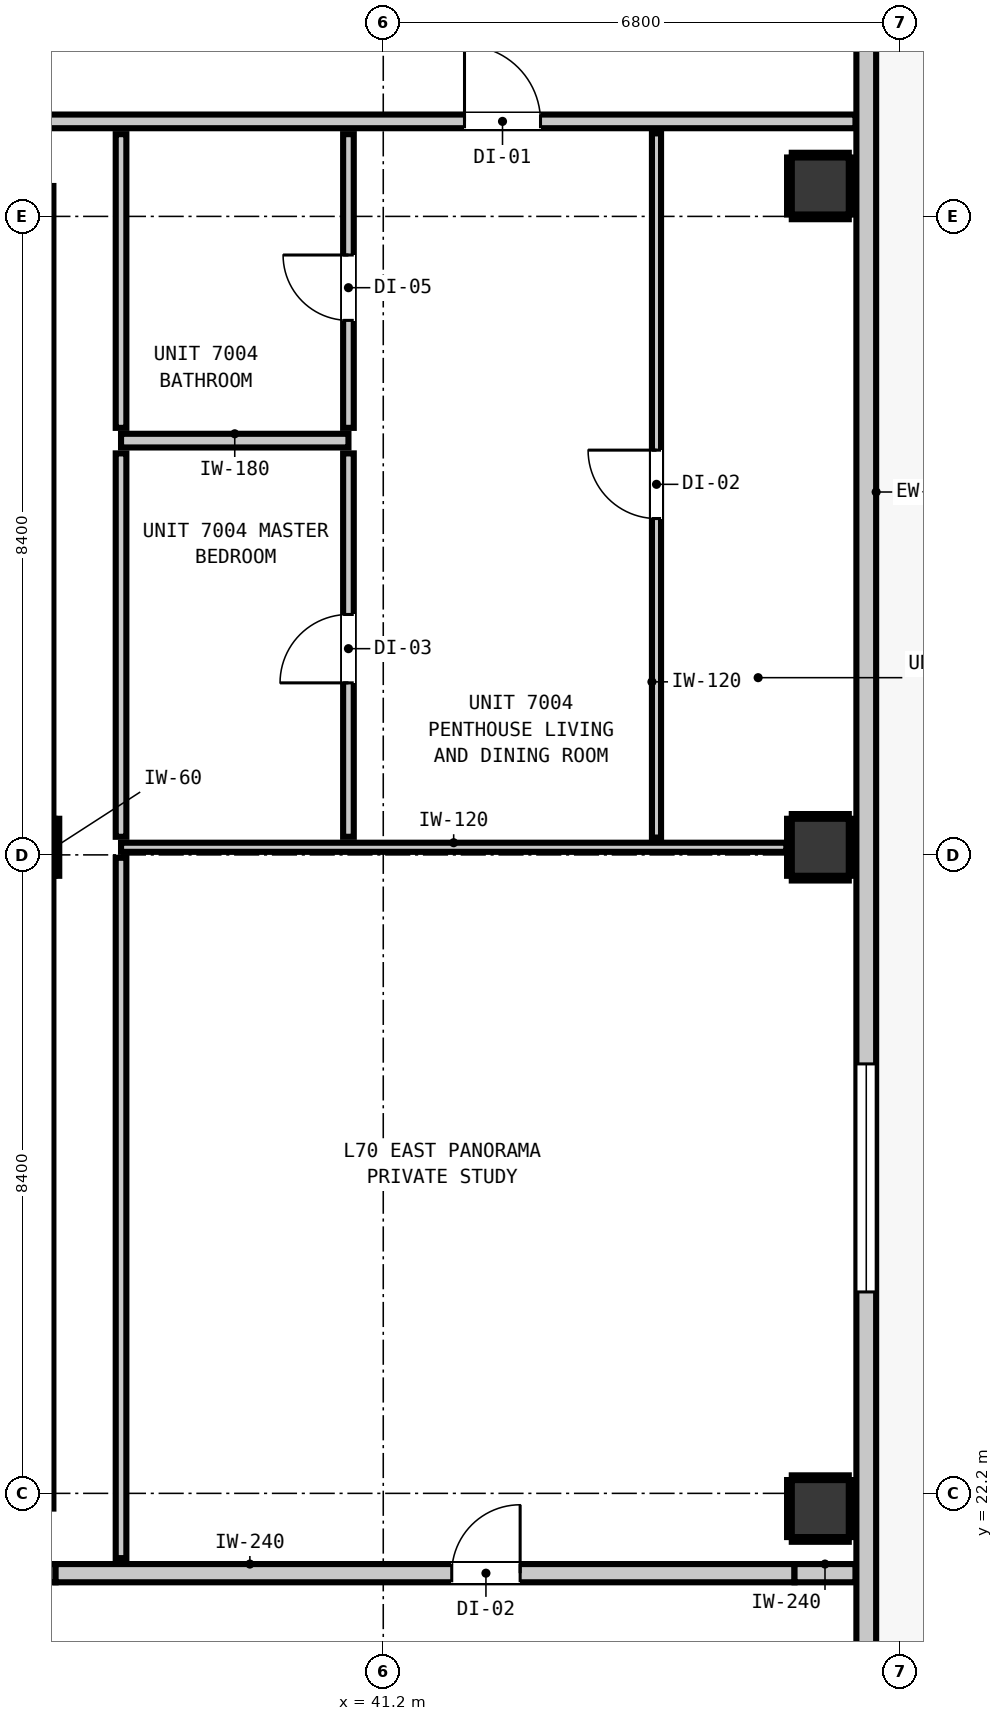
"""IFC4 building model, lengths in metres.
Left out: names, types, materials, properties, quantities, classifications, styles, units other than length and angle.
Written with IfcOpenShell. Run it as: python <this file> out.ifc"""

import sys

from ifc_helpers import new_model, si_unit, direction, frame, frame_2d, origin, origin_2d, place, context, subcontext, project, spatial, rectangle, extrude, element, fill, save


model = new_model("IFC4")
c1 = context("Model", 3, precision=1e-05, world=origin(), true_north=direction((0.0, 1.0)))
c2 = subcontext(c1, "Body", "Model", "MODEL_VIEW")
j1 = project(units=[si_unit("LENGTHUNIT", "METRE"), si_unit("PLANEANGLEUNIT", "RADIAN")], contexts=[c1])
p1 = place(None, origin())
s1 = spatial("IfcSite", under=j1, at=p1, CompositionType="ELEMENT")
p2 = place(p1, origin())
s2 = spatial("IfcBuilding", under=s1, at=p2, CompositionType="ELEMENT")
p3 = place(p2, frame((0.0, 0.0, 241.24)))
s3 = spatial("IfcBuildingStorey", under=s2, at=p3, CompositionType="ELEMENT", Elevation=241.24)
p4 = place(p3, frame((36.5, 30.7, 0.0), z_axis=(0.0, 0.0, 1.0), x_axis=(1.0, 0.0, 0.0)))
e1 = element("IfcColumn", 1, at=p4, inside=s3, PredefinedType="COLUMN", context=c2, shape_type="SweptSolid", body=[
    extrude(rectangle(XDim=0.75, YDim=0.75, at=origin_2d()), origin(), (0.0, 0.0, 1.0), 3.32),
])
p5 = place(p3, frame((36.46, 22.0, 0.0), z_axis=(0.0, 0.0, 1.0), x_axis=(0.0, 1.0, 0.0)))
e2 = element("IfcWall", 2, at=p5, inside=s3, PredefinedType="SHEAR", context=c2, shape_type="SweptSolid", body=[
    extrude(rectangle(XDim=8.32, YDim=0.8, at=frame_2d((4.16, 0.0))), origin(), (0.0, 0.0, 1.0), 3.32),
])
p6 = place(p3, frame((36.46, 31.08, 0.0), z_axis=(0.0, 0.0, 1.0), x_axis=(0.0, 1.0, 0.0)))
e3 = element("IfcWall", 3, at=p6, inside=s3, PredefinedType="SHEAR", context=c2, shape_type="SweptSolid", body=[
    extrude(rectangle(XDim=8.32, YDim=0.8, at=frame_2d((4.16, 0.0))), origin(), (0.0, 0.0, 1.0), 3.32),
])
for number, where, z_axis, x_axis in (
    (4, (46.95, 22.0, 0.0), (0.0, 0.0, 1.0), (1.0, 0.0, 0.0)),
    (5, (46.95, 30.7, 0.0), (0.0, 0.0, 1.0), (1.0, 0.0, 0.0)),
    (6, (46.95, 39.4, 0.0), (0.0, 0.0, 1.0), (1.0, 0.0, 0.0)),
):
    element("IfcColumn", number, at=place(p3, frame(where, z_axis=z_axis, x_axis=x_axis)), inside=s3, PredefinedType="COLUMN", context=c2, shape_type="SweptSolid", body=[
        extrude(rectangle(XDim=0.75, YDim=0.75, at=origin_2d()), origin(), (0.0, 0.0, 1.0), 3.32),
    ])
p7 = place(p3, frame((47.555, 48.855, 0.0), z_axis=(0.0, 0.0, 1.0), x_axis=(0.0, -1.0, 0.0)))
e7 = element("IfcWall", 7, at=p7, inside=s3, PredefinedType="STANDARD", context=c2, shape_type="SweptSolid", body=[
    extrude(rectangle(XDim=30.31, YDim=0.26, at=frame_2d((15.155, 0.0))), origin(), (0.0, 0.0, 1.0), 3.1),
])
p8 = place(p7, frame((0.91, 0.0, 0.0)))
e8 = element("IfcOpeningElement", 8, at=p8, cuts=e7, PredefinedType="OPENING", context=c2, shape_type="SweptSolid", body=[
    extrude(rectangle(XDim=1.0, YDim=2.15, at=frame_2d((0.5, 1.075))), frame((0.0, 0.14, 0.0), z_axis=(0.0, -1.0, 0.0), x_axis=(1.0, 0.0, 0.0)), (0.0, 0.0, 1.0), 0.28),
])
p9 = place(p7, frame((2.957, 0.0, 0.85)))
e9 = element("IfcOpeningElement", 9, at=p9, cuts=e7, PredefinedType="OPENING", context=c2, shape_type="SweptSolid", body=[
    extrude(rectangle(XDim=3.0, YDim=2.1, at=frame_2d((1.5, 1.05))), frame((0.0, 0.14, 0.0), z_axis=(0.0, -1.0, 0.0), x_axis=(1.0, 0.0, 0.0)), (0.0, 0.0, 1.0), 0.28),
])
p10 = place(p7, frame((21.005, 0.0, 0.85)))
e10 = element("IfcOpeningElement", 10, at=p10, cuts=e7, PredefinedType="OPENING", context=c2, shape_type="SweptSolid", body=[
    extrude(rectangle(XDim=3.0, YDim=2.1, at=frame_2d((1.5, 1.05))), frame((0.0, 0.14, 0.0), z_axis=(0.0, -1.0, 0.0), x_axis=(1.0, 0.0, 0.0)), (0.0, 0.0, 1.0), 0.28),
])
p11 = place(p3, frame((10.787, 21.15, 0.0), z_axis=(0.0, 0.0, 1.0), x_axis=(1.0, 0.0, 0.0)))
e11 = element("IfcWall", 11, at=p11, inside=s3, PredefinedType="PARTITIONING", context=c2, shape_type="SweptSolid", body=[
    extrude(rectangle(XDim=26.102, YDim=0.24, at=frame_2d((13.051, 0.0))), origin(), (0.0, 0.0, 1.0), 3.1),
])
p12 = place(p11, frame((7.423, 0.0, 0.0)))
e12 = element("IfcOpeningElement", 12, at=p12, cuts=e11, PredefinedType="OPENING", context=c2, shape_type="SweptSolid", body=[
    extrude(rectangle(XDim=1.1, YDim=2.15, at=frame_2d((0.55, 1.075))), frame((0.0, 0.13, 0.0), z_axis=(0.0, -1.0, 0.0), x_axis=(1.0, 0.0, 0.0)), (0.0, 0.0, 1.0), 0.26),
])
p13 = place(p3, frame((36.889, 21.15, 0.0), z_axis=(0.0, 0.0, 1.0), x_axis=(1.0, 0.0, 0.0)))
e13 = element("IfcWall", 13, at=p13, inside=s3, PredefinedType="PARTITIONING", context=c2, shape_type="SweptSolid", body=[
    extrude(rectangle(XDim=9.722, YDim=0.24, at=frame_2d((4.861, 0.0))), origin(), (0.0, 0.0, 1.0), 2.477),
])
p14 = place(p13, frame((5.212, 0.0, 0.0)))
e14 = element("IfcOpeningElement", 14, at=p14, cuts=e13, PredefinedType="OPENING", context=c2, shape_type="SweptSolid", body=[
    extrude(rectangle(XDim=0.9, YDim=2.1, at=frame_2d((0.45, 1.05))), frame((0.0, 0.13, 0.0), z_axis=(0.0, -1.0, 0.0), x_axis=(1.0, 0.0, 0.0)), (0.0, 0.0, 1.0), 0.26),
])
p15 = place(p3, frame((46.611, 21.15, 0.0), z_axis=(0.0, 0.0, 1.0), x_axis=(1.0, 0.0, 0.0)))
e15 = element("IfcWall", 15, at=p15, inside=s3, PredefinedType="PARTITIONING", context=c2, shape_type="SweptSolid", body=[
    extrude(rectangle(XDim=0.802, YDim=0.24, at=frame_2d((0.401, 0.0))), origin(), (0.0, 0.0, 1.0), 3.1),
])
p16 = place(p3, frame((37.75, 36.05, 0.0), z_axis=(0.0, 0.0, 1.0), x_axis=(1.0, 0.0, 0.0)))
e16 = element("IfcWall", 16, at=p16, inside=s3, PredefinedType="PARTITIONING", context=c2, shape_type="SweptSolid", body=[
    extrude(rectangle(XDim=2.992, YDim=0.18, at=frame_2d((1.496, 0.0))), origin(), (0.0, 0.0, 1.0), 3.1),
])
p17 = place(p3, frame((10.787, 40.25, 0.0), z_axis=(0.0, 0.0, 1.0), x_axis=(1.0, 0.0, 0.0)))
e17 = element("IfcWall", 17, at=p17, inside=s3, PredefinedType="PARTITIONING", context=c2, shape_type="SweptSolid", body=[
    extrude(rectangle(XDim=36.626, YDim=0.18, at=frame_2d((18.313, 0.0))), origin(), (0.0, 0.0, 1.0), 3.1),
])
p18 = place(p17, frame((6.648, 0.0, 0.0)))
e18 = element("IfcOpeningElement", 18, at=p18, cuts=e17, PredefinedType="OPENING", context=c2, shape_type="SweptSolid", body=[
    extrude(rectangle(XDim=1.4, YDim=2.15, at=frame_2d((0.7, 1.075))), frame((0.0, 0.1, 0.0), z_axis=(0.0, -1.0, 0.0), x_axis=(1.0, 0.0, 0.0)), (0.0, 0.0, 1.0), 0.2),
])
p19 = place(p17, frame((31.482, 0.0, 0.0)))
e19 = element("IfcOpeningElement", 19, at=p19, cuts=e17, PredefinedType="OPENING", context=c2, shape_type="SweptSolid", body=[
    extrude(rectangle(XDim=1.0, YDim=2.15, at=frame_2d((0.5, 1.075))), frame((0.0, 0.1, 0.0), z_axis=(0.0, -1.0, 0.0), x_axis=(1.0, 0.0, 0.0)), (0.0, 0.0, 1.0), 0.2),
])
p20 = place(p3, frame((37.75, 30.7, 0.0), z_axis=(0.0, 0.0, 1.0), x_axis=(1.0, 0.0, 0.0)))
e20 = element("IfcWall", 20, at=p20, inside=s3, PredefinedType="PARTITIONING", context=c2, shape_type="SweptSolid", body=[
    extrude(rectangle(XDim=8.753, YDim=0.12, at=frame_2d((4.376, 0.0))), origin(), (0.0, 0.0, 1.0), 2.335),
])
p21 = place(p3, frame((37.75, 21.348, 0.0), z_axis=(0.0, 0.0, 1.0), x_axis=(0.0, 1.0, 0.0)))
e21 = element("IfcWall", 21, at=p21, inside=s3, PredefinedType="PARTITIONING", context=c2, shape_type="SweptSolid", body=[
    extrude(rectangle(XDim=9.214, YDim=0.14, at=frame_2d((4.607, 0.0))), origin(), (0.0, 0.0, 1.0), 3.1),
])
p22 = place(p3, frame((37.75, 30.838, 0.0), z_axis=(0.0, 0.0, 1.0), x_axis=(0.0, 1.0, 0.0)))
e22 = element("IfcWall", 22, at=p22, inside=s3, PredefinedType="PARTITIONING", context=c2, shape_type="SweptSolid", body=[
    extrude(rectangle(XDim=5.044, YDim=0.14, at=frame_2d((2.522, 0.0))), origin(), (0.0, 0.0, 1.0), 3.1),
])
p23 = place(p3, frame((37.75, 36.218, 0.0), z_axis=(0.0, 0.0, 1.0), x_axis=(0.0, 1.0, 0.0)))
e23 = element("IfcWall", 23, at=p23, inside=s3, PredefinedType="PARTITIONING", context=c2, shape_type="SweptSolid", body=[
    extrude(rectangle(XDim=3.864, YDim=0.14, at=frame_2d((1.932, 0.0))), origin(), (0.0, 0.0, 1.0), 3.1),
])
p24 = place(p3, frame((40.742, 30.838, 0.0), z_axis=(0.0, 0.0, 1.0), x_axis=(0.0, 1.0, 0.0)))
e24 = element("IfcWall", 24, at=p24, inside=s3, PredefinedType="PARTITIONING", context=c2, shape_type="SweptSolid", body=[
    extrude(rectangle(XDim=5.044, YDim=0.14, at=frame_2d((2.522, 0.0))), origin(), (0.0, 0.0, 1.0), 3.1),
])
p25 = place(p24, frame((2.025, 0.0, 0.0)))
e25 = element("IfcOpeningElement", 25, at=p25, cuts=e24, PredefinedType="OPENING", context=c2, shape_type="SweptSolid", body=[
    extrude(rectangle(XDim=0.9, YDim=2.1, at=frame_2d((0.45, 1.05))), frame((0.0, 0.08, 0.0), z_axis=(0.0, -1.0, 0.0), x_axis=(1.0, 0.0, 0.0)), (0.0, 0.0, 1.0), 0.16),
])
p26 = place(p3, frame((40.742, 36.218, 0.0), z_axis=(0.0, 0.0, 1.0), x_axis=(0.0, 1.0, 0.0)))
e26 = element("IfcWall", 26, at=p26, inside=s3, PredefinedType="PARTITIONING", context=c2, shape_type="SweptSolid", body=[
    extrude(rectangle(XDim=3.864, YDim=0.14, at=frame_2d((1.932, 0.0))), origin(), (0.0, 0.0, 1.0), 3.1),
])
p27 = place(p26, frame((1.414, 0.0, 0.0)))
e27 = element("IfcOpeningElement", 27, at=p27, cuts=e26, PredefinedType="OPENING", context=c2, shape_type="SweptSolid", body=[
    extrude(rectangle(XDim=0.86, YDim=2.02, at=frame_2d((0.43, 1.01))), frame((0.0, 0.08, 0.0), z_axis=(0.0, -1.0, 0.0), x_axis=(1.0, 0.0, 0.0)), (0.0, 0.0, 1.0), 0.16),
])
p28 = place(p3, frame((44.795, 30.828, 0.0), z_axis=(0.0, 0.0, 1.0), x_axis=(0.0, 1.0, 0.0)))
e28 = element("IfcWall", 28, at=p28, inside=s3, PredefinedType="PARTITIONING", context=c2, shape_type="SweptSolid", body=[
    extrude(rectangle(XDim=9.264, YDim=0.12, at=frame_2d((4.632, 0.0))), origin(), (0.0, 0.0, 1.0), 3.1),
])
p29 = place(p28, frame((4.197, 0.0, 0.0)))
e29 = element("IfcOpeningElement", 29, at=p29, cuts=e28, PredefinedType="OPENING", context=c2, shape_type="SweptSolid", body=[
    extrude(rectangle(XDim=0.9, YDim=2.1, at=frame_2d((0.45, 1.05))), frame((0.0, 0.07, 0.0), z_axis=(0.0, -1.0, 0.0), x_axis=(1.0, 0.0, 0.0)), (0.0, 0.0, 1.0), 0.14),
])
for number, where, z_axis, x_axis in (
    (30, (36.907, 30.325, 0.0), (0.0, 0.0, 1.0), (0.0, 1.0, 0.0)),
    (31, (46.575, 21.593, 0.0), (0.0, 0.0, 1.0), (1.0, 0.0, 0.0)),
    (32, (46.575, 22.407, 0.0), (0.0, 0.0, 1.0), (1.0, 0.0, 0.0)),
    (33, (46.543, 21.625, 0.0), (0.0, 0.0, 1.0), (0.0, 1.0, 0.0)),
    (34, (47.357, 21.625, 0.0), (0.0, 0.0, 1.0), (0.0, 1.0, 0.0)),
    (35, (46.575, 30.293, 0.0), (0.0, 0.0, 1.0), (1.0, 0.0, 0.0)),
    (36, (46.575, 31.107, 0.0), (0.0, 0.0, 1.0), (1.0, 0.0, 0.0)),
    (37, (46.543, 30.325, 0.0), (0.0, 0.0, 1.0), (0.0, 1.0, 0.0)),
    (38, (47.357, 30.325, 0.0), (0.0, 0.0, 1.0), (0.0, 1.0, 0.0)),
    (39, (46.575, 38.993, 0.0), (0.0, 0.0, 1.0), (1.0, 0.0, 0.0)),
    (40, (46.575, 39.807, 0.0), (0.0, 0.0, 1.0), (1.0, 0.0, 0.0)),
    (41, (46.543, 39.025, 0.0), (0.0, 0.0, 1.0), (0.0, 1.0, 0.0)),
    (42, (47.357, 39.025, 0.0), (0.0, 0.0, 1.0), (0.0, 1.0, 0.0)),
):
    element("IfcWall", number, at=place(p3, frame(where, z_axis=z_axis, x_axis=x_axis)), inside=s3, PredefinedType="PARTITIONING", context=c2, shape_type="SweptSolid", body=[
        extrude(rectangle(XDim=0.75, YDim=0.06, at=frame_2d((0.375, 0.0))), origin(), (0.0, 0.0, 1.0), 1.45),
    ])
p30 = place(p10, origin())
e43 = element("IfcWindow", 43, at=p30, inside=s3, PartitioningType="SINGLE_PANEL", PredefinedType="WINDOW", context=c2, shape_type="SweptSolid", body=[
    extrude(rectangle(XDim=3.0, YDim=2.1, at=frame_2d((1.5, 1.05))), frame((0.0, 0.03, 0.0), z_axis=(0.0, -1.0, 0.0), x_axis=(1.0, 0.0, 0.0)), (0.0, 0.0, 1.0), 0.06),
])
fill(e10, e43)
p31 = place(p14, origin())
e44 = element("IfcDoor", 44, at=p31, inside=s3, OperationType="SINGLE_SWING_RIGHT", PredefinedType="DOOR", context=c2, shape_type="SweptSolid", body=[
    extrude(rectangle(XDim=0.9, YDim=2.1, at=frame_2d((0.45, 1.05))), frame((0.0, 0.025, 0.0), z_axis=(0.0, -1.0, 0.0), x_axis=(1.0, 0.0, 0.0)), (0.0, 0.0, 1.0), 0.05),
])
fill(e14, e44)
p32 = place(p19, origin())
e45 = element("IfcDoor", 45, at=p32, inside=s3, OperationType="SINGLE_SWING_LEFT", PredefinedType="DOOR", context=c2, shape_type="SweptSolid", body=[
    extrude(rectangle(XDim=1.0, YDim=2.15, at=frame_2d((0.5, 1.075))), frame((0.0, 0.025, 0.0), z_axis=(0.0, -1.0, 0.0), x_axis=(1.0, 0.0, 0.0)), (0.0, 0.0, 1.0), 0.05),
])
fill(e19, e45)
p33 = place(p27, origin())
e46 = element("IfcDoor", 46, at=p33, inside=s3, OperationType="SINGLE_SWING_RIGHT", PredefinedType="DOOR", context=c2, shape_type="SweptSolid", body=[
    extrude(rectangle(XDim=0.86, YDim=2.02, at=frame_2d((0.43, 1.01))), frame((0.0, 0.025, 0.0), z_axis=(0.0, -1.0, 0.0), x_axis=(1.0, 0.0, 0.0)), (0.0, 0.0, 1.0), 0.05),
])
fill(e27, e46)
p34 = place(p25, origin())
e47 = element("IfcDoor", 47, at=p34, inside=s3, OperationType="SINGLE_SWING_LEFT", PredefinedType="DOOR", context=c2, shape_type="SweptSolid", body=[
    extrude(rectangle(XDim=0.9, YDim=2.1, at=frame_2d((0.45, 1.05))), frame((0.0, 0.025, 0.0), z_axis=(0.0, -1.0, 0.0), x_axis=(1.0, 0.0, 0.0)), (0.0, 0.0, 1.0), 0.05),
])
fill(e25, e47)
p35 = place(p29, origin())
e48 = element("IfcDoor", 48, at=p35, inside=s3, OperationType="SINGLE_SWING_RIGHT", PredefinedType="DOOR", context=c2, shape_type="SweptSolid", body=[
    extrude(rectangle(XDim=0.9, YDim=2.1, at=frame_2d((0.45, 1.05))), frame((0.0, 0.025, 0.0), z_axis=(0.0, -1.0, 0.0), x_axis=(1.0, 0.0, 0.0)), (0.0, 0.0, 1.0), 0.05),
])
fill(e29, e48)
save(model, sys.argv[1])
